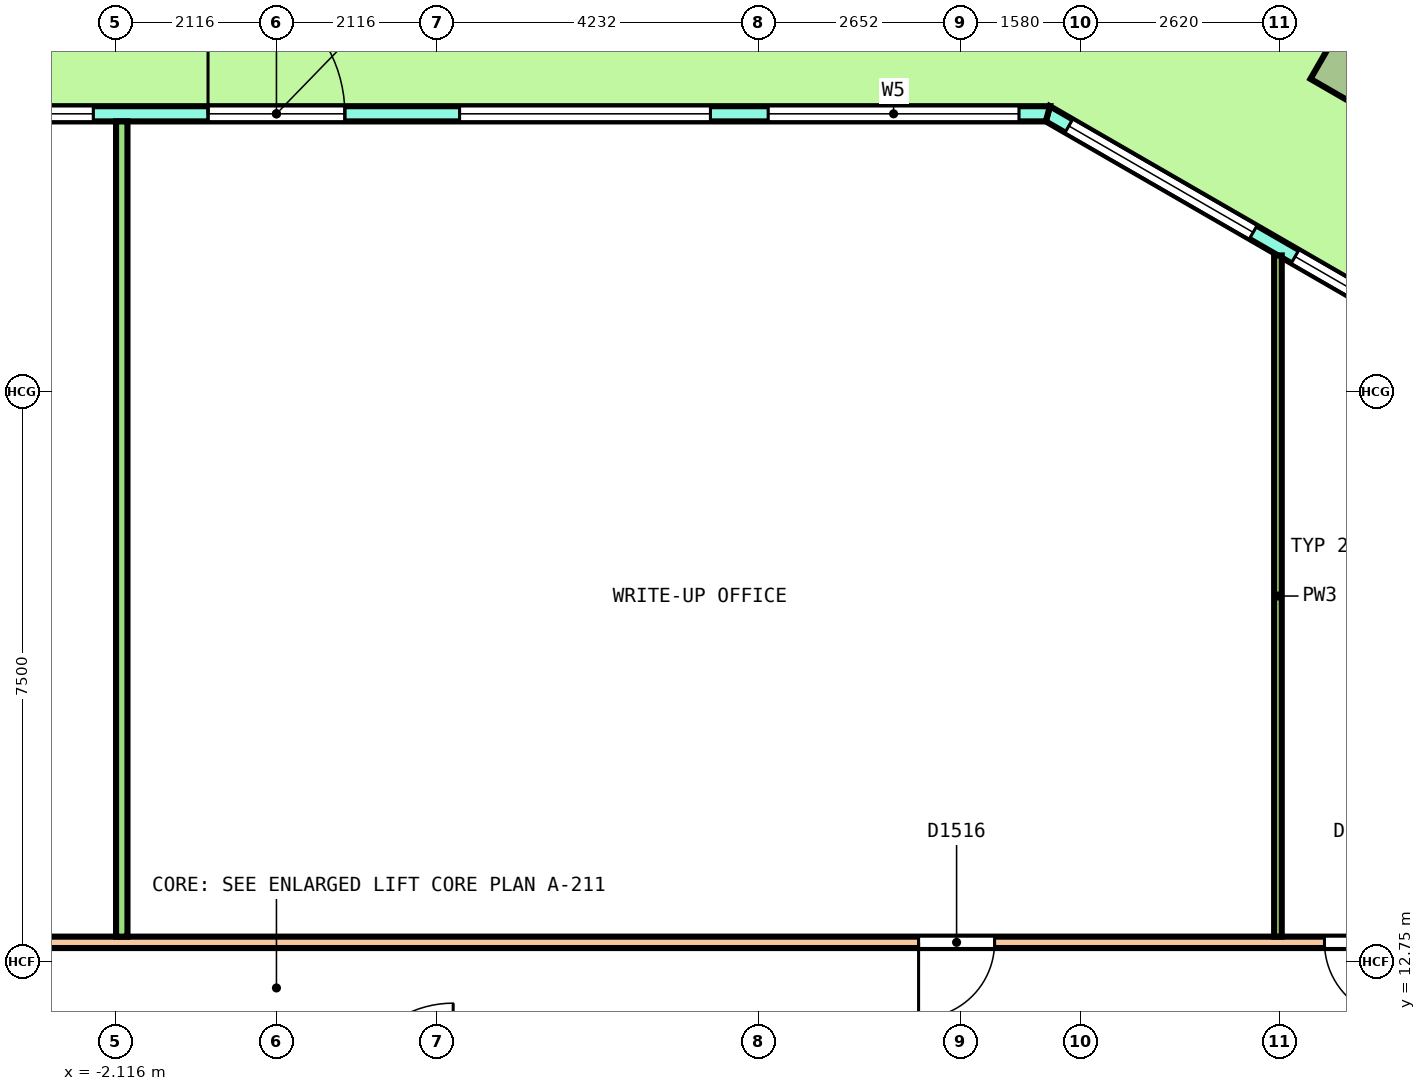
"""IFC4 building model, lengths in metres.
Left out: names, types, materials, properties, quantities, classifications, styles, units other than length and angle.
Written with IfcOpenShell. Run it as: python <this file> out.ifc"""

import sys

from ifc_helpers import new_model, si_unit, direction, frame, frame_2d, origin, origin_2d, place, context, subcontext, project, spatial, polyline, rectangle, outline, extrude, element, fill, save


model = new_model("IFC4")
c1 = context("Model", 3, precision=1e-05, world=origin(), true_north=direction((0.0, 1.0)))
c2 = subcontext(c1, "Body", "Model", "MODEL_VIEW")
j1 = project(units=[si_unit("LENGTHUNIT", "METRE"), si_unit("PLANEANGLEUNIT", "RADIAN")], contexts=[c1])
p1 = place(None, origin())
s1 = spatial("IfcSite", under=j1, at=p1, CompositionType="ELEMENT")
p2 = place(p1, origin())
s2 = spatial("IfcBuilding", under=s1, at=p2, CompositionType="ELEMENT")
p3 = place(p2, frame((0.0, 0.0, 89.6)))
s3 = spatial("IfcBuildingStorey", under=s2, at=p3, CompositionType="ELEMENT", Elevation=89.6)
p4 = place(p3, frame((14.526, 24.606, 0.0), z_axis=(0.036267419622, 0.0, 0.999342120734), x_axis=(-0.865313477853, 0.500246354177, 0.031403346616)))
e1 = element("IfcColumn", 1, at=p4, inside=s3, PredefinedType="COLUMN", context=c2, shape_type="SweptSolid", body=[
    extrude(rectangle(XDim=1.35, YDim=1.35, at=origin_2d()), origin(), (0.0, 0.0, 1.0), 4.052),
])
p5 = place(p3, frame((16.103, 20.463, 0.0), z_axis=(0.0, 0.0, 1.0), x_axis=(-0.866029458321, 0.49999297727, 0.0)))
e2 = element("IfcWall", 2, at=p5, inside=s3, PredefinedType="SOLIDWALL", context=c2, shape_type="SweptSolid", body=[
    extrude(outline(polyline([(-0.027, -0.1), (1.128, -0.1), (2.282, -0.1), (3.437, -0.1), (4.592, -0.1), (5.747, -0.1), (6.901, -0.1), (6.848, 0.1), (5.711, 0.1), (4.574, 0.1), (3.437, 0.1), (2.301, 0.1), (1.164, 0.1), (0.027, 0.1), (-0.027, -0.1)])), origin(), (0.0, 0.0, 1.0), 4.1),
])
p6 = place(p5, frame((0.319, 0.0, 0.1)))
e3 = element("IfcOpeningElement", 3, at=p6, cuts=e2, PredefinedType="OPENING", context=c2, shape_type="SweptSolid", body=[
    extrude(rectangle(XDim=2.8, YDim=2.9, at=frame_2d((1.4, 1.45))), frame((0.0, 0.11, 0.0), z_axis=(0.0, -1.0, 0.0), x_axis=(1.0, 0.0, 0.0)), (0.0, 0.0, 1.0), 0.22),
])
p7 = place(p5, frame((3.756, 0.0, 0.1)))
e4 = element("IfcOpeningElement", 4, at=p7, cuts=e2, PredefinedType="OPENING", context=c2, shape_type="SweptSolid", body=[
    extrude(rectangle(XDim=2.8, YDim=2.9, at=frame_2d((1.4, 1.45))), frame((0.0, 0.11, 0.0), z_axis=(0.0, -1.0, 0.0), x_axis=(1.0, 0.0, 0.0)), (0.0, 0.0, 1.0), 0.22),
])
p8 = place(p3, frame((10.149, 23.9, 0.0), z_axis=(0.0, 0.0, 1.0), x_axis=(-1.0, 0.0, 0.0)))
e5 = element("IfcWall", 5, at=p8, inside=s3, PredefinedType="SOLIDWALL", context=c2, shape_type="SweptSolid", body=[
    extrude(outline(polyline([(-0.027, -0.1), (0.991, -0.1), (2.008, -0.1), (3.026, -0.1), (4.043, -0.1), (5.061, -0.1), (6.079, -0.1), (7.096, -0.1), (8.114, -0.1), (9.131, -0.1), (10.149, -0.1), (11.167, -0.1), (12.184, -0.1), (13.202, -0.1), (14.219, -0.1), (15.237, -0.1), (16.254, -0.1), (17.272, -0.1), (18.29, -0.1), (19.307, -0.1), (20.325, -0.1), (20.271, 0.1), (19.259, 0.1), (18.247, 0.1), (17.234, 0.1), (16.222, 0.1), (15.21, 0.1), (14.198, 0.1), (13.186, 0.1), (12.173, 0.1), (11.161, 0.1), (10.149, 0.1), (9.137, 0.1), (8.125, 0.1), (7.112, 0.1), (6.1, 0.1), (5.088, 0.1), (4.076, 0.1), (3.063, 0.1), (2.051, 0.1), (1.039, 0.1), (0.027, 0.1), (-0.027, -0.1)])), origin(), (0.0, 0.0, 1.0), 4.1),
])
p9 = place(p8, frame((0.38, 0.0, 0.1)))
e6 = element("IfcOpeningElement", 6, at=p9, cuts=e5, PredefinedType="OPENING", context=c2, shape_type="SweptSolid", body=[
    extrude(rectangle(XDim=3.3, YDim=2.9, at=frame_2d((1.65, 1.45))), frame((0.0, 0.11, 0.0), z_axis=(0.0, -1.0, 0.0), x_axis=(1.0, 0.0, 0.0)), (0.0, 0.0, 1.0), 0.22),
])
p10 = place(p8, frame((4.439, 0.0, 0.1)))
e7 = element("IfcOpeningElement", 7, at=p10, cuts=e5, PredefinedType="OPENING", context=c2, shape_type="SweptSolid", body=[
    extrude(rectangle(XDim=3.3, YDim=2.9, at=frame_2d((1.65, 1.45))), frame((0.0, 0.11, 0.0), z_axis=(0.0, -1.0, 0.0), x_axis=(1.0, 0.0, 0.0)), (0.0, 0.0, 1.0), 0.22),
])
p11 = place(p8, frame((9.249, 0.0, 0.0)))
e8 = element("IfcOpeningElement", 8, at=p11, cuts=e5, PredefinedType="OPENING", context=c2, shape_type="SweptSolid", body=[
    extrude(rectangle(XDim=1.8, YDim=2.4, at=frame_2d((0.9, 1.2))), frame((0.0, 0.11, 0.0), z_axis=(0.0, -1.0, 0.0), x_axis=(1.0, 0.0, 0.0)), (0.0, 0.0, 1.0), 0.22),
])
p12 = place(p8, frame((9.249, 0.0, 2.55)))
e9 = element("IfcOpeningElement", 9, at=p12, cuts=e5, PredefinedType="OPENING", context=c2, shape_type="SweptSolid", body=[
    extrude(rectangle(XDim=1.8, YDim=0.45, at=frame_2d((0.9, 0.225))), frame((0.0, 0.11, 0.0), z_axis=(0.0, -1.0, 0.0), x_axis=(1.0, 0.0, 0.0)), (0.0, 0.0, 1.0), 0.22),
])
p13 = place(p8, frame((12.559, 0.0, 0.1)))
e10 = element("IfcOpeningElement", 10, at=p13, cuts=e5, PredefinedType="OPENING", context=c2, shape_type="SweptSolid", body=[
    extrude(rectangle(XDim=3.3, YDim=2.9, at=frame_2d((1.65, 1.45))), frame((0.0, 0.11, 0.0), z_axis=(0.0, -1.0, 0.0), x_axis=(1.0, 0.0, 0.0)), (0.0, 0.0, 1.0), 0.22),
])
p14 = place(p8, frame((16.618, 0.0, 0.1)))
e11 = element("IfcOpeningElement", 11, at=p14, cuts=e5, PredefinedType="OPENING", context=c2, shape_type="SweptSolid", body=[
    extrude(rectangle(XDim=3.3, YDim=2.9, at=frame_2d((1.65, 1.45))), frame((0.0, 0.11, 0.0), z_axis=(0.0, -1.0, 0.0), x_axis=(1.0, 0.0, 0.0)), (0.0, 0.0, 1.0), 0.22),
])
p15 = place(p3, frame((-15.325, 13.0, 0.0), z_axis=(0.0, 0.0, 1.0), x_axis=(1.0, 0.0, 0.0)))
e12 = element("IfcWall", 12, at=p15, inside=s3, PredefinedType="PARTITIONING", context=c2, shape_type="SweptSolid", body=[
    extrude(rectangle(XDim=30.675, YDim=0.15, at=frame_2d((15.337, 0.0))), origin(), (0.0, 0.0, 1.0), 3.05),
])
p16 = place(p15, frame((29.113, 0.0, 0.0)))
e13 = element("IfcOpeningElement", 13, at=p16, cuts=e12, PredefinedType="OPENING", context=c2, shape_type="SweptSolid", body=[
    extrude(rectangle(XDim=1.0, YDim=2.1, at=frame_2d((0.5, 1.05))), frame((0.0, 0.085, 0.0), z_axis=(0.0, -1.0, 0.0), x_axis=(1.0, 0.0, 0.0)), (0.0, 0.0, 1.0), 0.17),
])
p17 = place(p15, frame((23.773, 0.0, 0.0)))
e14 = element("IfcOpeningElement", 14, at=p17, cuts=e12, PredefinedType="OPENING", context=c2, shape_type="SweptSolid", body=[
    extrude(rectangle(XDim=1.0, YDim=2.1, at=frame_2d((0.5, 1.05))), frame((0.0, 0.085, 0.0), z_axis=(0.0, -1.0, 0.0), x_axis=(1.0, 0.0, 0.0)), (0.0, 0.0, 1.0), 0.17),
])
p18 = place(p15, frame((7.727, 0.0, 0.0)))
e15 = element("IfcOpeningElement", 15, at=p18, cuts=e12, PredefinedType="OPENING", context=c2, shape_type="SweptSolid", body=[
    extrude(rectangle(XDim=1.2, YDim=2.1, at=frame_2d((0.6, 1.05))), frame((0.0, 0.085, 0.0), z_axis=(0.0, -1.0, 0.0), x_axis=(1.0, 0.0, 0.0)), (0.0, 0.0, 1.0), 0.17),
])
p19 = place(p3, frame((-2.035, 13.075, 0.0), z_axis=(0.0, 0.0, 1.0), x_axis=(0.0, 1.0, 0.0)))
e16 = element("IfcWall", 16, at=p19, inside=s3, PredefinedType="PARTITIONING", context=c2, shape_type="SweptSolid", body=[
    extrude(rectangle(XDim=10.725, YDim=0.15, at=frame_2d((5.363, 0.0))), origin(), (0.0, 0.0, 1.0), 3.05),
])
p20 = place(p3, frame((13.176, 13.075, 0.0), z_axis=(0.0, 0.0, 1.0), x_axis=(0.0, 1.0, 0.0)))
e17 = element("IfcWall", 17, at=p20, inside=s3, PredefinedType="PARTITIONING", context=c2, shape_type="SweptSolid", body=[
    extrude(rectangle(XDim=8.962, YDim=0.1, at=frame_2d((4.481, 0.0))), origin(), (0.0, 0.0, 1.0), 3.05),
])
p21 = place(p6, origin())
e18 = element("IfcWindow", 18, at=p21, inside=s3, PartitioningType="SINGLE_PANEL", PredefinedType="WINDOW", context=c2, shape_type="SweptSolid", body=[
    extrude(rectangle(XDim=2.8, YDim=2.9, at=frame_2d((1.4, 1.45))), frame((0.0, 0.03, 0.0), z_axis=(0.0, -1.0, 0.0), x_axis=(1.0, 0.0, 0.0)), (0.0, 0.0, 1.0), 0.06),
])
fill(e3, e18)
p22 = place(p7, origin())
e19 = element("IfcWindow", 19, at=p22, inside=s3, PartitioningType="SINGLE_PANEL", PredefinedType="WINDOW", context=c2, shape_type="SweptSolid", body=[
    extrude(rectangle(XDim=2.8, YDim=2.9, at=frame_2d((1.4, 1.45))), frame((0.0, 0.03, 0.0), z_axis=(0.0, -1.0, 0.0), x_axis=(1.0, 0.0, 0.0)), (0.0, 0.0, 1.0), 0.06),
])
fill(e4, e19)
p23 = place(p9, origin())
e20 = element("IfcWindow", 20, at=p23, inside=s3, PartitioningType="SINGLE_PANEL", PredefinedType="WINDOW", context=c2, shape_type="SweptSolid", body=[
    extrude(rectangle(XDim=3.3, YDim=2.9, at=frame_2d((1.65, 1.45))), frame((0.0, 0.03, 0.0), z_axis=(0.0, -1.0, 0.0), x_axis=(1.0, 0.0, 0.0)), (0.0, 0.0, 1.0), 0.06),
])
fill(e6, e20)
p24 = place(p10, origin())
e21 = element("IfcWindow", 21, at=p24, inside=s3, PartitioningType="SINGLE_PANEL", PredefinedType="WINDOW", context=c2, shape_type="SweptSolid", body=[
    extrude(rectangle(XDim=3.3, YDim=2.9, at=frame_2d((1.65, 1.45))), frame((0.0, 0.03, 0.0), z_axis=(0.0, -1.0, 0.0), x_axis=(1.0, 0.0, 0.0)), (0.0, 0.0, 1.0), 0.06),
])
fill(e7, e21)
p25 = place(p11, origin())
e22 = element("IfcDoor", 22, at=p25, inside=s3, OperationType="DOUBLE_DOOR_SINGLE_SWING", PredefinedType="DOOR", context=c2, shape_type="SweptSolid", body=[
    extrude(rectangle(XDim=1.8, YDim=2.4, at=frame_2d((0.9, 1.2))), frame((0.0, 0.025, 0.0), z_axis=(0.0, -1.0, 0.0), x_axis=(1.0, 0.0, 0.0)), (0.0, 0.0, 1.0), 0.05),
])
fill(e8, e22)
p26 = place(p12, origin())
e23 = element("IfcWindow", 23, at=p26, inside=s3, PartitioningType="SINGLE_PANEL", PredefinedType="WINDOW", context=c2, shape_type="SweptSolid", body=[
    extrude(rectangle(XDim=1.8, YDim=0.45, at=frame_2d((0.9, 0.225))), frame((0.0, 0.03, 0.0), z_axis=(0.0, -1.0, 0.0), x_axis=(1.0, 0.0, 0.0)), (0.0, 0.0, 1.0), 0.06),
])
fill(e9, e23)
p27 = place(p13, origin())
e24 = element("IfcWindow", 24, at=p27, inside=s3, PartitioningType="SINGLE_PANEL", PredefinedType="WINDOW", context=c2, shape_type="SweptSolid", body=[
    extrude(rectangle(XDim=3.3, YDim=2.9, at=frame_2d((1.65, 1.45))), frame((0.0, 0.03, 0.0), z_axis=(0.0, -1.0, 0.0), x_axis=(1.0, 0.0, 0.0)), (0.0, 0.0, 1.0), 0.06),
])
fill(e10, e24)
p28 = place(p16, origin())
e25 = element("IfcDoor", 25, at=p28, inside=s3, OperationType="SINGLE_SWING_LEFT", PredefinedType="DOOR", context=c2, shape_type="SweptSolid", body=[
    extrude(rectangle(XDim=1.0, YDim=2.1, at=frame_2d((0.5, 1.05))), frame((0.0, 0.025, 0.0), z_axis=(0.0, -1.0, 0.0), x_axis=(1.0, 0.0, 0.0)), (0.0, 0.0, 1.0), 0.05),
])
fill(e13, e25)
p29 = place(p17, origin())
e26 = element("IfcDoor", 26, at=p29, inside=s3, OperationType="SINGLE_SWING_RIGHT", PredefinedType="DOOR", context=c2, shape_type="SweptSolid", body=[
    extrude(rectangle(XDim=1.0, YDim=2.1, at=frame_2d((0.5, 1.05))), frame((0.0, 0.025, 0.0), z_axis=(0.0, -1.0, 0.0), x_axis=(1.0, 0.0, 0.0)), (0.0, 0.0, 1.0), 0.05),
])
fill(e14, e26)
save(model, sys.argv[1])
